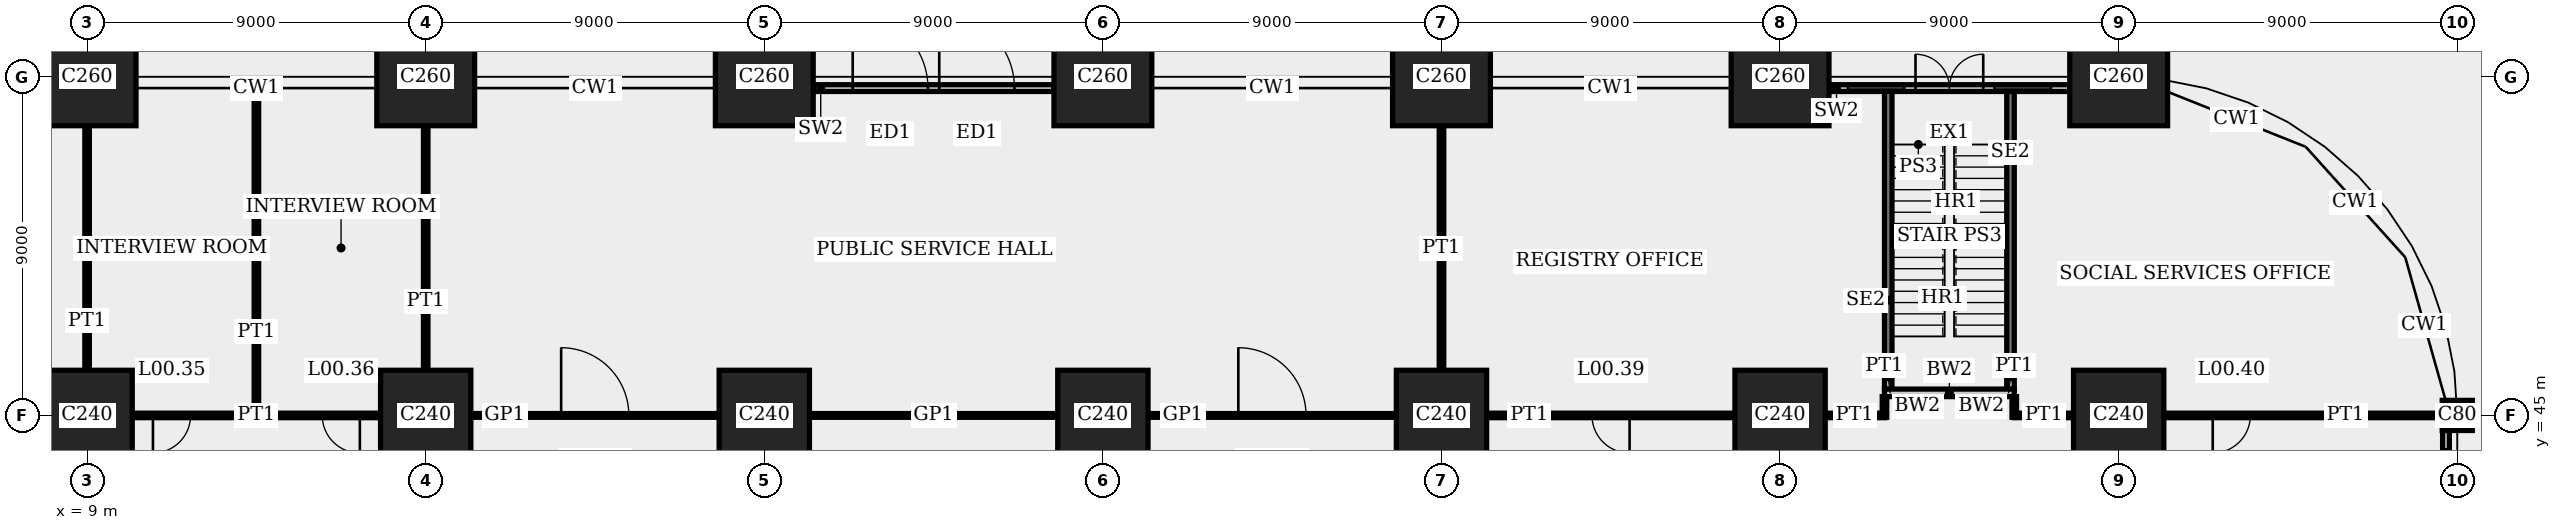
"""IFC4 building model, lengths in metres.
Left out: names, types, materials, properties, quantities, classifications, styles, units other than length and angle.
Written with IfcOpenShell. Run it as: python <this file> out.ifc"""

import sys

from ifc_helpers import new_model, si_unit, direction, frame, frame_2d, origin, origin_2d, place, context, subcontext, project, spatial, rectangle, extrude, element, fill, save


model = new_model("IFC4")
c1 = context("Model", 3, precision=1e-05, world=origin(), true_north=direction((0.0, 1.0)))
c2 = subcontext(c1, "Body", "Model", "MODEL_VIEW")
j1 = project(units=[si_unit("LENGTHUNIT", "METRE"), si_unit("PLANEANGLEUNIT", "RADIAN")], contexts=[c1])
p1 = place(None, origin())
s1 = spatial("IfcSite", under=j1, at=p1, CompositionType="ELEMENT")
p2 = place(p1, origin())
s2 = spatial("IfcBuilding", under=s1, at=p2, CompositionType="ELEMENT")
p3 = place(p2, origin())
s3 = spatial("IfcBuildingStorey", under=s2, at=p3, CompositionType="ELEMENT", Elevation=0.0)
p4 = place(p3, frame((9.0, 45.0, 0.0), z_axis=(0.0, 0.0, 1.0), x_axis=(1.0, 0.0, 0.0)))
e1 = element("IfcColumn", 1, at=p4, inside=s3, PredefinedType="COLUMN", context=c2, shape_type="SweptSolid", body=[
    extrude(rectangle(XDim=2.4, YDim=2.4, at=origin_2d()), origin(), (0.0, 0.0, 1.0), 5.4),
])
p5 = place(p3, frame((9.0, 54.0, 0.0), z_axis=(0.0, 0.0, 1.0), x_axis=(1.0, 0.0, 0.0)))
e2 = element("IfcColumn", 2, at=p5, inside=s3, PredefinedType="COLUMN", context=c2, shape_type="SweptSolid", body=[
    extrude(rectangle(XDim=2.6, YDim=2.6, at=origin_2d()), origin(), (0.0, 0.0, 1.0), 5.4),
])
p6 = place(p3, frame((18.0, 45.0, 0.0), z_axis=(0.0, 0.0, 1.0), x_axis=(1.0, 0.0, 0.0)))
e3 = element("IfcColumn", 3, at=p6, inside=s3, PredefinedType="COLUMN", context=c2, shape_type="SweptSolid", body=[
    extrude(rectangle(XDim=2.4, YDim=2.4, at=origin_2d()), origin(), (0.0, 0.0, 1.0), 5.4),
])
p7 = place(p3, frame((18.0, 54.0, 0.0), z_axis=(0.0, 0.0, 1.0), x_axis=(1.0, 0.0, 0.0)))
e4 = element("IfcColumn", 4, at=p7, inside=s3, PredefinedType="COLUMN", context=c2, shape_type="SweptSolid", body=[
    extrude(rectangle(XDim=2.6, YDim=2.6, at=origin_2d()), origin(), (0.0, 0.0, 1.0), 5.4),
])
p8 = place(p3, frame((27.0, 45.0, 0.0), z_axis=(0.0, 0.0, 1.0), x_axis=(1.0, 0.0, 0.0)))
e5 = element("IfcColumn", 5, at=p8, inside=s3, PredefinedType="COLUMN", context=c2, shape_type="SweptSolid", body=[
    extrude(rectangle(XDim=2.4, YDim=2.4, at=origin_2d()), origin(), (0.0, 0.0, 1.0), 5.4),
])
p9 = place(p3, frame((27.0, 54.0, 0.0), z_axis=(0.0, 0.0, 1.0), x_axis=(1.0, 0.0, 0.0)))
e6 = element("IfcColumn", 6, at=p9, inside=s3, PredefinedType="COLUMN", context=c2, shape_type="SweptSolid", body=[
    extrude(rectangle(XDim=2.6, YDim=2.6, at=origin_2d()), origin(), (0.0, 0.0, 1.0), 5.4),
])
p10 = place(p3, frame((36.0, 45.0, 0.0), z_axis=(0.0, 0.0, 1.0), x_axis=(1.0, 0.0, 0.0)))
e7 = element("IfcColumn", 7, at=p10, inside=s3, PredefinedType="COLUMN", context=c2, shape_type="SweptSolid", body=[
    extrude(rectangle(XDim=2.4, YDim=2.4, at=origin_2d()), origin(), (0.0, 0.0, 1.0), 5.4),
])
p11 = place(p3, frame((36.0, 54.0, 0.0), z_axis=(0.0, 0.0, 1.0), x_axis=(1.0, 0.0, 0.0)))
e8 = element("IfcColumn", 8, at=p11, inside=s3, PredefinedType="COLUMN", context=c2, shape_type="SweptSolid", body=[
    extrude(rectangle(XDim=2.6, YDim=2.6, at=origin_2d()), origin(), (0.0, 0.0, 1.0), 5.4),
])
p12 = place(p3, frame((45.0, 45.0, 0.0), z_axis=(0.0, 0.0, 1.0), x_axis=(1.0, 0.0, 0.0)))
e9 = element("IfcColumn", 9, at=p12, inside=s3, PredefinedType="COLUMN", context=c2, shape_type="SweptSolid", body=[
    extrude(rectangle(XDim=2.4, YDim=2.4, at=origin_2d()), origin(), (0.0, 0.0, 1.0), 5.4),
])
p13 = place(p3, frame((45.0, 54.0, 0.0), z_axis=(0.0, 0.0, 1.0), x_axis=(1.0, 0.0, 0.0)))
e10 = element("IfcColumn", 10, at=p13, inside=s3, PredefinedType="COLUMN", context=c2, shape_type="SweptSolid", body=[
    extrude(rectangle(XDim=2.6, YDim=2.6, at=origin_2d()), origin(), (0.0, 0.0, 1.0), 5.4),
])
p14 = place(p3, frame((54.0, 45.0, 0.0), z_axis=(0.0, 0.0, 1.0), x_axis=(1.0, 0.0, 0.0)))
e11 = element("IfcColumn", 11, at=p14, inside=s3, PredefinedType="COLUMN", context=c2, shape_type="SweptSolid", body=[
    extrude(rectangle(XDim=2.4, YDim=2.4, at=origin_2d()), origin(), (0.0, 0.0, 1.0), 5.4),
])
p15 = place(p3, frame((54.0, 54.0, 0.0), z_axis=(0.0, 0.0, 1.0), x_axis=(1.0, 0.0, 0.0)))
e12 = element("IfcColumn", 12, at=p15, inside=s3, PredefinedType="COLUMN", context=c2, shape_type="SweptSolid", body=[
    extrude(rectangle(XDim=2.6, YDim=2.6, at=origin_2d()), origin(), (0.0, 0.0, 1.0), 5.4),
])
p16 = place(p3, frame((63.0, 45.0, 0.0), z_axis=(0.0, 0.0, 1.0), x_axis=(1.0, 0.0, 0.0)))
e13 = element("IfcColumn", 13, at=p16, inside=s3, PredefinedType="COLUMN", context=c2, shape_type="SweptSolid", body=[
    extrude(rectangle(XDim=2.4, YDim=2.4, at=origin_2d()), origin(), (0.0, 0.0, 1.0), 5.4),
])
p17 = place(p3, frame((63.0, 54.0, 0.0), z_axis=(0.0, 0.0, 1.0), x_axis=(1.0, 0.0, 0.0)))
e14 = element("IfcColumn", 14, at=p17, inside=s3, PredefinedType="COLUMN", context=c2, shape_type="SweptSolid", body=[
    extrude(rectangle(XDim=2.6, YDim=2.6, at=origin_2d()), origin(), (0.0, 0.0, 1.0), 5.4),
])
p18 = place(p3, frame((72.0, 45.0, 0.0), z_axis=(0.0, 0.0, 1.0), x_axis=(1.0, 0.0, 0.0)))
e15 = element("IfcColumn", 15, at=p18, inside=s3, PredefinedType="COLUMN", context=c2, shape_type="SweptSolid", body=[
    extrude(rectangle(XDim=0.8, YDim=0.8, at=origin_2d()), origin(), (0.0, 0.0, 1.0), 5.4),
])
p19 = place(p3, frame((28.3, 53.7, 0.0), z_axis=(0.0, 0.0, 1.0), x_axis=(1.0, 0.0, 0.0)))
e16 = element("IfcWall", 16, at=p19, inside=s3, PredefinedType="SOLIDWALL", context=c2, shape_type="SweptSolid", body=[
    extrude(rectangle(XDim=6.4, YDim=0.18, at=frame_2d((3.2, 0.0))), origin(), (0.0, 0.0, 1.0), 4.3),
])
p20 = place(p19, frame((1.05, 0.0, 0.0)))
e17 = element("IfcOpeningElement", 17, at=p20, cuts=e16, PredefinedType="OPENING", context=c2, shape_type="SweptSolid", body=[
    extrude(rectangle(XDim=2.0, YDim=3.0, at=frame_2d((1.0, 1.5))), frame((0.0, 0.1, 0.0), z_axis=(0.0, -1.0, 0.0), x_axis=(1.0, 0.0, 0.0)), (0.0, 0.0, 1.0), 0.2),
])
p21 = place(p19, frame((3.35, 0.0, 0.0)))
e18 = element("IfcOpeningElement", 18, at=p21, cuts=e16, PredefinedType="OPENING", context=c2, shape_type="SweptSolid", body=[
    extrude(rectangle(XDim=2.0, YDim=3.0, at=frame_2d((1.0, 1.5))), frame((0.0, 0.1, 0.0), z_axis=(0.0, -1.0, 0.0), x_axis=(1.0, 0.0, 0.0)), (0.0, 0.0, 1.0), 0.2),
])
p22 = place(p3, frame((55.3, 53.7, 0.0), z_axis=(0.0, 0.0, 1.0), x_axis=(1.0, 0.0, 0.0)))
e19 = element("IfcWall", 19, at=p22, inside=s3, PredefinedType="SOLIDWALL", context=c2, shape_type="SweptSolid", body=[
    extrude(rectangle(XDim=6.4, YDim=0.18, at=frame_2d((3.2, 0.0))), origin(), (0.0, 0.0, 1.0), 4.3),
])
p23 = place(p22, frame((2.3, 0.0, 0.0)))
e20 = element("IfcOpeningElement", 20, at=p23, cuts=e19, PredefinedType="OPENING", context=c2, shape_type="SweptSolid", body=[
    extrude(rectangle(XDim=1.8, YDim=2.4, at=frame_2d((0.9, 1.2))), frame((0.0, 0.1, 0.0), z_axis=(0.0, -1.0, 0.0), x_axis=(1.0, 0.0, 0.0)), (0.0, 0.0, 1.0), 0.2),
])
p24 = place(p22, frame((0.5, 0.0, 0.3)))
e21 = element("IfcOpeningElement", 21, at=p24, cuts=e19, PredefinedType="OPENING", context=c2, shape_type="SweptSolid", body=[
    extrude(rectangle(XDim=1.5, YDim=2.4, at=frame_2d((0.75, 1.2))), frame((0.0, 0.1, 0.0), z_axis=(0.0, -1.0, 0.0), x_axis=(1.0, 0.0, 0.0)), (0.0, 0.0, 1.0), 0.2),
])
p25 = place(p22, frame((4.4, 0.0, 0.3)))
e22 = element("IfcOpeningElement", 22, at=p25, cuts=e19, PredefinedType="OPENING", context=c2, shape_type="SweptSolid", body=[
    extrude(rectangle(XDim=1.5, YDim=2.4, at=frame_2d((0.75, 1.2))), frame((0.0, 0.1, 0.0), z_axis=(0.0, -1.0, 0.0), x_axis=(1.0, 0.0, 0.0)), (0.0, 0.0, 1.0), 0.2),
])
p26 = place(p3, frame((71.7, 36.4, 0.0), z_axis=(0.0, 0.0, 1.0), x_axis=(0.0, 1.0, 0.0)))
e23 = element("IfcWall", 23, at=p26, inside=s3, PredefinedType="SOLIDWALL", context=c2, shape_type="SweptSolid", body=[
    extrude(rectangle(XDim=8.2, YDim=0.18, at=frame_2d((4.1, 0.0))), origin(), (0.0, 0.0, 1.0), 4.3),
])
p27 = place(p26, frame((3.2, 0.0, 0.0)))
e24 = element("IfcOpeningElement", 24, at=p27, cuts=e23, PredefinedType="OPENING", context=c2, shape_type="SweptSolid", body=[
    extrude(rectangle(XDim=1.8, YDim=2.4, at=frame_2d((0.9, 1.2))), frame((0.0, 0.1, 0.0), z_axis=(0.0, -1.0, 0.0), x_axis=(1.0, 0.0, 0.0)), (0.0, 0.0, 1.0), 0.2),
])
p28 = place(p26, frame((0.5, 0.0, 0.3)))
e25 = element("IfcOpeningElement", 25, at=p28, cuts=e23, PredefinedType="OPENING", context=c2, shape_type="SweptSolid", body=[
    extrude(rectangle(XDim=1.5, YDim=2.4, at=frame_2d((0.75, 1.2))), frame((0.0, 0.1, 0.0), z_axis=(0.0, -1.0, 0.0), x_axis=(1.0, 0.0, 0.0)), (0.0, 0.0, 1.0), 0.2),
])
p29 = place(p26, frame((6.2, 0.0, 0.3)))
e26 = element("IfcOpeningElement", 26, at=p29, cuts=e23, PredefinedType="OPENING", context=c2, shape_type="SweptSolid", body=[
    extrude(rectangle(XDim=1.5, YDim=2.4, at=frame_2d((0.75, 1.2))), frame((0.0, 0.1, 0.0), z_axis=(0.0, -1.0, 0.0), x_axis=(1.0, 0.0, 0.0)), (0.0, 0.0, 1.0), 0.2),
])
p30 = place(p3, frame((10.2, 45.0, 0.0), z_axis=(0.0, 0.0, 1.0), x_axis=(1.0, 0.0, 0.0)))
e27 = element("IfcWall", 27, at=p30, inside=s3, PredefinedType="PARTITIONING", context=c2, shape_type="SweptSolid", body=[
    extrude(rectangle(XDim=6.6, YDim=0.12, at=frame_2d((3.3, 0.0))), origin(), (0.0, 0.0, 1.0), 4.3),
])
p31 = place(p30, frame((0.55, 0.0, 0.0)))
e28 = element("IfcOpeningElement", 28, at=p31, cuts=e27, PredefinedType="OPENING", context=c2, shape_type="SweptSolid", body=[
    extrude(rectangle(XDim=1.0, YDim=2.4, at=frame_2d((0.5, 1.2))), frame((0.0, 0.07, 0.0), z_axis=(0.0, -1.0, 0.0), x_axis=(1.0, 0.0, 0.0)), (0.0, 0.0, 1.0), 0.14),
])
p32 = place(p30, frame((5.05, 0.0, 0.0)))
e29 = element("IfcOpeningElement", 29, at=p32, cuts=e27, PredefinedType="OPENING", context=c2, shape_type="SweptSolid", body=[
    extrude(rectangle(XDim=1.0, YDim=2.4, at=frame_2d((0.5, 1.2))), frame((0.0, 0.07, 0.0), z_axis=(0.0, -1.0, 0.0), x_axis=(1.0, 0.0, 0.0)), (0.0, 0.0, 1.0), 0.14),
])
p33 = place(p3, frame((19.2, 45.0, 0.0), z_axis=(0.0, 0.0, 1.0), x_axis=(1.0, 0.0, 0.0)))
e30 = element("IfcWall", 30, at=p33, inside=s3, PredefinedType="PARTITIONING", context=c2, shape_type="SweptSolid", body=[
    extrude(rectangle(XDim=6.6, YDim=0.1, at=frame_2d((3.3, 0.0))), origin(), (0.0, 0.0, 1.0), 4.3),
])
p34 = place(p33, frame((2.4, 0.0, 0.0)))
e31 = element("IfcOpeningElement", 31, at=p34, cuts=e30, PredefinedType="OPENING", context=c2, shape_type="SweptSolid", body=[
    extrude(rectangle(XDim=1.8, YDim=2.7, at=frame_2d((0.9, 1.35))), frame((0.0, 0.06, 0.0), z_axis=(0.0, -1.0, 0.0), x_axis=(1.0, 0.0, 0.0)), (0.0, 0.0, 1.0), 0.12),
])
p35 = place(p3, frame((28.2, 45.0, 0.0), z_axis=(0.0, 0.0, 1.0), x_axis=(1.0, 0.0, 0.0)))
e32 = element("IfcWall", 32, at=p35, inside=s3, PredefinedType="PARTITIONING", context=c2, shape_type="SweptSolid", body=[
    extrude(rectangle(XDim=6.6, YDim=0.1, at=frame_2d((3.3, 0.0))), origin(), (0.0, 0.0, 1.0), 4.3),
])
p36 = place(p3, frame((37.2, 45.0, 0.0), z_axis=(0.0, 0.0, 1.0), x_axis=(1.0, 0.0, 0.0)))
e33 = element("IfcWall", 33, at=p36, inside=s3, PredefinedType="PARTITIONING", context=c2, shape_type="SweptSolid", body=[
    extrude(rectangle(XDim=6.6, YDim=0.1, at=frame_2d((3.3, 0.0))), origin(), (0.0, 0.0, 1.0), 4.3),
])
p37 = place(p36, frame((2.4, 0.0, 0.0)))
e34 = element("IfcOpeningElement", 34, at=p37, cuts=e33, PredefinedType="OPENING", context=c2, shape_type="SweptSolid", body=[
    extrude(rectangle(XDim=1.8, YDim=2.7, at=frame_2d((0.9, 1.35))), frame((0.0, 0.06, 0.0), z_axis=(0.0, -1.0, 0.0), x_axis=(1.0, 0.0, 0.0)), (0.0, 0.0, 1.0), 0.12),
])
p38 = place(p3, frame((46.2, 45.0, 0.0), z_axis=(0.0, 0.0, 1.0), x_axis=(1.0, 0.0, 0.0)))
e35 = element("IfcWall", 35, at=p38, inside=s3, PredefinedType="PARTITIONING", context=c2, shape_type="SweptSolid", body=[
    extrude(rectangle(XDim=6.6, YDim=0.12, at=frame_2d((3.3, 0.0))), origin(), (0.0, 0.0, 1.0), 4.3),
])
p39 = place(p38, frame((2.8, 0.0, 0.0)))
e36 = element("IfcOpeningElement", 36, at=p39, cuts=e35, PredefinedType="OPENING", context=c2, shape_type="SweptSolid", body=[
    extrude(rectangle(XDim=1.0, YDim=2.4, at=frame_2d((0.5, 1.2))), frame((0.0, 0.07, 0.0), z_axis=(0.0, -1.0, 0.0), x_axis=(1.0, 0.0, 0.0)), (0.0, 0.0, 1.0), 0.14),
])
for number, where, z_axis, x_axis in (
    (37, (55.2, 45.0, 0.0), (0.0, 0.0, 1.0), (1.0, 0.0, 0.0)),
    (38, (60.225, 45.0, 0.0), (0.0, 0.0, 1.0), (1.0, 0.0, 0.0)),
):
    element("IfcWall", number, at=place(p3, frame(where, z_axis=z_axis, x_axis=x_axis)), inside=s3, PredefinedType="PARTITIONING", context=c2, shape_type="SweptSolid", body=[
        extrude(rectangle(XDim=1.575, YDim=0.12, at=frame_2d((0.788, 0.0))), origin(), (0.0, 0.0, 1.0), 4.3),
    ])
p40 = place(p3, frame((64.2, 45.0, 0.0), z_axis=(0.0, 0.0, 1.0), x_axis=(1.0, 0.0, 0.0)))
e39 = element("IfcWall", 39, at=p40, inside=s3, PredefinedType="PARTITIONING", context=c2, shape_type="SweptSolid", body=[
    extrude(rectangle(XDim=7.4, YDim=0.12, at=frame_2d((3.7, 0.0))), origin(), (0.0, 0.0, 1.0), 4.3),
])
p41 = place(p40, frame((1.3, 0.0, 0.0)))
e40 = element("IfcOpeningElement", 40, at=p41, cuts=e39, PredefinedType="OPENING", context=c2, shape_type="SweptSolid", body=[
    extrude(rectangle(XDim=1.0, YDim=2.4, at=frame_2d((0.5, 1.2))), frame((0.0, 0.07, 0.0), z_axis=(0.0, -1.0, 0.0), x_axis=(1.0, 0.0, 0.0)), (0.0, 0.0, 1.0), 0.14),
])
for number, where, z_axis, x_axis in (
    (41, (56.775, 44.95, 0.0), (0.0, 0.0, 1.0), (0.0, 1.0, 0.0)),
    (42, (60.225, 44.95, 0.0), (0.0, 0.0, 1.0), (0.0, 1.0, 0.0)),
):
    element("IfcWall", number, at=place(p3, frame(where, z_axis=z_axis, x_axis=x_axis)), inside=s3, PredefinedType="PARTITIONING", context=c2, shape_type="SweptSolid", body=[
        extrude(rectangle(XDim=0.55, YDim=0.12, at=frame_2d((0.275, 0.0))), origin(), (0.0, 0.0, 1.0), 5.1),
    ])
p42 = place(p3, frame((9.0, 46.2, 0.0), z_axis=(0.0, 0.0, 1.0), x_axis=(0.0, 1.0, 0.0)))
e43 = element("IfcWall", 43, at=p42, inside=s3, PredefinedType="PARTITIONING", context=c2, shape_type="SweptSolid", body=[
    extrude(rectangle(XDim=6.5, YDim=0.12, at=frame_2d((3.25, 0.0))), origin(), (0.0, 0.0, 1.0), 4.3),
])
p43 = place(p3, frame((13.5, 45.0, 0.0), z_axis=(0.0, 0.0, 1.0), x_axis=(0.0, 1.0, 0.0)))
e44 = element("IfcWall", 44, at=p43, inside=s3, PredefinedType="PARTITIONING", context=c2, shape_type="SweptSolid", body=[
    extrude(rectangle(XDim=8.69, YDim=0.12, at=frame_2d((4.345, 0.0))), origin(), (0.0, 0.0, 1.0), 5.1),
])
for number, where, z_axis, x_axis in (
    (45, (18.0, 46.2, 0.0), (0.0, 0.0, 1.0), (0.0, 1.0, 0.0)),
    (46, (45.0, 46.2, 0.0), (0.0, 0.0, 1.0), (0.0, 1.0, 0.0)),
):
    element("IfcWall", number, at=place(p3, frame(where, z_axis=z_axis, x_axis=x_axis)), inside=s3, PredefinedType="PARTITIONING", context=c2, shape_type="SweptSolid", body=[
        extrude(rectangle(XDim=6.5, YDim=0.12, at=frame_2d((3.25, 0.0))), origin(), (0.0, 0.0, 1.0), 4.3),
    ])
for number, where, z_axis, x_axis in (
    (47, (56.875, 53.61, 0.0), (0.0, 0.0, 1.0), (0.0, -1.0, 0.0)),
    (48, (60.125, 53.61, 0.0), (0.0, 0.0, 1.0), (0.0, -1.0, 0.0)),
):
    element("IfcWall", number, at=place(p3, frame(where, z_axis=z_axis, x_axis=x_axis)), inside=s3, PredefinedType="SOLIDWALL", context=c2, shape_type="SweptSolid", body=[
        extrude(rectangle(XDim=7.26, YDim=0.2, at=frame_2d((3.63, 0.0))), origin(), (0.0, 0.0, 1.0), 5.4),
    ])
for number, where, z_axis, x_axis in (
    (49, (56.875, 46.35, 0.0), (0.0, 0.0, 1.0), (0.0, -1.0, 0.0)),
    (50, (60.125, 46.35, 0.0), (0.0, 0.0, 1.0), (0.0, -1.0, 0.0)),
):
    element("IfcWall", number, at=place(p3, frame(where, z_axis=z_axis, x_axis=x_axis)), inside=s3, PredefinedType="SOLIDWALL", context=c2, shape_type="SweptSolid", body=[
        extrude(rectangle(XDim=0.65, YDim=0.2, at=frame_2d((0.325, 0.0))), origin(), (0.0, 0.0, 1.0), 5.4),
    ])
p44 = place(p3, frame((56.775, 45.6, 0.0), z_axis=(0.0, 0.0, 1.0), x_axis=(1.0, 0.0, 0.0)))
e51 = element("IfcWall", 51, at=p44, inside=s3, PredefinedType="SOLIDWALL", context=c2, shape_type="SweptSolid", body=[
    extrude(rectangle(XDim=3.45, YDim=0.2, at=frame_2d((1.725, 0.0))), origin(), (0.0, 0.0, 1.0), 5.1),
])
p45 = place(p20, origin())
e52 = element("IfcDoor", 52, at=p45, inside=s3, OperationType="DOUBLE_DOOR_DOUBLE_SWING", PredefinedType="DOOR", context=c2, shape_type="SweptSolid", body=[
    extrude(rectangle(XDim=2.0, YDim=3.0, at=frame_2d((1.0, 1.5))), frame((0.0, 0.025, 0.0), z_axis=(0.0, -1.0, 0.0), x_axis=(1.0, 0.0, 0.0)), (0.0, 0.0, 1.0), 0.05),
])
fill(e17, e52)
p46 = place(p21, origin())
e53 = element("IfcDoor", 53, at=p46, inside=s3, OperationType="DOUBLE_DOOR_DOUBLE_SWING", PredefinedType="DOOR", context=c2, shape_type="SweptSolid", body=[
    extrude(rectangle(XDim=2.0, YDim=3.0, at=frame_2d((1.0, 1.5))), frame((0.0, 0.025, 0.0), z_axis=(0.0, -1.0, 0.0), x_axis=(1.0, 0.0, 0.0)), (0.0, 0.0, 1.0), 0.05),
])
fill(e18, e53)
p47 = place(p23, origin())
e54 = element("IfcDoor", 54, at=p47, inside=s3, OperationType="DOUBLE_DOOR_SINGLE_SWING", PredefinedType="DOOR", context=c2, shape_type="SweptSolid", body=[
    extrude(rectangle(XDim=1.8, YDim=2.4, at=frame_2d((0.9, 1.2))), frame((0.0, 0.035, 0.0), z_axis=(0.0, -1.0, 0.0), x_axis=(1.0, 0.0, 0.0)), (0.0, 0.0, 1.0), 0.07),
])
fill(e20, e54)
p48 = place(p24, origin())
e55 = element("IfcWindow", 55, at=p48, inside=s3, PartitioningType="SINGLE_PANEL", PredefinedType="WINDOW", context=c2, shape_type="SweptSolid", body=[
    extrude(rectangle(XDim=1.5, YDim=2.4, at=frame_2d((0.75, 1.2))), frame((0.0, 0.03, 0.0), z_axis=(0.0, -1.0, 0.0), x_axis=(1.0, 0.0, 0.0)), (0.0, 0.0, 1.0), 0.06),
])
fill(e21, e55)
p49 = place(p25, origin())
e56 = element("IfcWindow", 56, at=p49, inside=s3, PartitioningType="SINGLE_PANEL", PredefinedType="WINDOW", context=c2, shape_type="SweptSolid", body=[
    extrude(rectangle(XDim=1.5, YDim=2.4, at=frame_2d((0.75, 1.2))), frame((0.0, 0.03, 0.0), z_axis=(0.0, -1.0, 0.0), x_axis=(1.0, 0.0, 0.0)), (0.0, 0.0, 1.0), 0.06),
])
fill(e22, e56)
p50 = place(p29, origin())
e57 = element("IfcWindow", 57, at=p50, inside=s3, PartitioningType="SINGLE_PANEL", PredefinedType="WINDOW", context=c2, shape_type="SweptSolid", body=[
    extrude(rectangle(XDim=1.5, YDim=2.4, at=frame_2d((0.75, 1.2))), frame((0.0, 0.03, 0.0), z_axis=(0.0, -1.0, 0.0), x_axis=(1.0, 0.0, 0.0)), (0.0, 0.0, 1.0), 0.06),
])
fill(e26, e57)
p51 = place(p31, origin())
e58 = element("IfcDoor", 58, at=p51, inside=s3, OperationType="SINGLE_SWING_LEFT", PredefinedType="DOOR", context=c2, shape_type="SweptSolid", body=[
    extrude(rectangle(XDim=1.0, YDim=2.4, at=frame_2d((0.5, 1.2))), frame((0.0, 0.025, 0.0), z_axis=(0.0, -1.0, 0.0), x_axis=(1.0, 0.0, 0.0)), (0.0, 0.0, 1.0), 0.05),
])
fill(e28, e58)
p52 = place(p32, origin())
e59 = element("IfcDoor", 59, at=p52, inside=s3, OperationType="SINGLE_SWING_RIGHT", PredefinedType="DOOR", context=c2, shape_type="SweptSolid", body=[
    extrude(rectangle(XDim=1.0, YDim=2.4, at=frame_2d((0.5, 1.2))), frame((0.0, 0.025, 0.0), z_axis=(0.0, -1.0, 0.0), x_axis=(1.0, 0.0, 0.0)), (0.0, 0.0, 1.0), 0.05),
])
fill(e29, e59)
p53 = place(p34, origin())
e60 = element("IfcDoor", 60, at=p53, inside=s3, OperationType="DOUBLE_DOOR_DOUBLE_SWING", PredefinedType="DOOR", context=c2, shape_type="SweptSolid", body=[
    extrude(rectangle(XDim=1.8, YDim=2.7, at=frame_2d((0.9, 1.35))), frame((0.0, 0.025, 0.0), z_axis=(0.0, -1.0, 0.0), x_axis=(1.0, 0.0, 0.0)), (0.0, 0.0, 1.0), 0.05),
])
fill(e31, e60)
p54 = place(p37, origin())
e61 = element("IfcDoor", 61, at=p54, inside=s3, OperationType="DOUBLE_DOOR_DOUBLE_SWING", PredefinedType="DOOR", context=c2, shape_type="SweptSolid", body=[
    extrude(rectangle(XDim=1.8, YDim=2.7, at=frame_2d((0.9, 1.35))), frame((0.0, 0.025, 0.0), z_axis=(0.0, -1.0, 0.0), x_axis=(1.0, 0.0, 0.0)), (0.0, 0.0, 1.0), 0.05),
])
fill(e34, e61)
p55 = place(p39, origin())
e62 = element("IfcDoor", 62, at=p55, inside=s3, OperationType="SINGLE_SWING_RIGHT", PredefinedType="DOOR", context=c2, shape_type="SweptSolid", body=[
    extrude(rectangle(XDim=1.0, YDim=2.4, at=frame_2d((0.5, 1.2))), frame((0.0, 0.025, 0.0), z_axis=(0.0, -1.0, 0.0), x_axis=(1.0, 0.0, 0.0)), (0.0, 0.0, 1.0), 0.05),
])
fill(e36, e62)
p56 = place(p41, origin())
e63 = element("IfcDoor", 63, at=p56, inside=s3, OperationType="SINGLE_SWING_LEFT", PredefinedType="DOOR", context=c2, shape_type="SweptSolid", body=[
    extrude(rectangle(XDim=1.0, YDim=2.4, at=frame_2d((0.5, 1.2))), frame((0.0, 0.025, 0.0), z_axis=(0.0, -1.0, 0.0), x_axis=(1.0, 0.0, 0.0)), (0.0, 0.0, 1.0), 0.05),
])
fill(e40, e63)
save(model, sys.argv[1])
